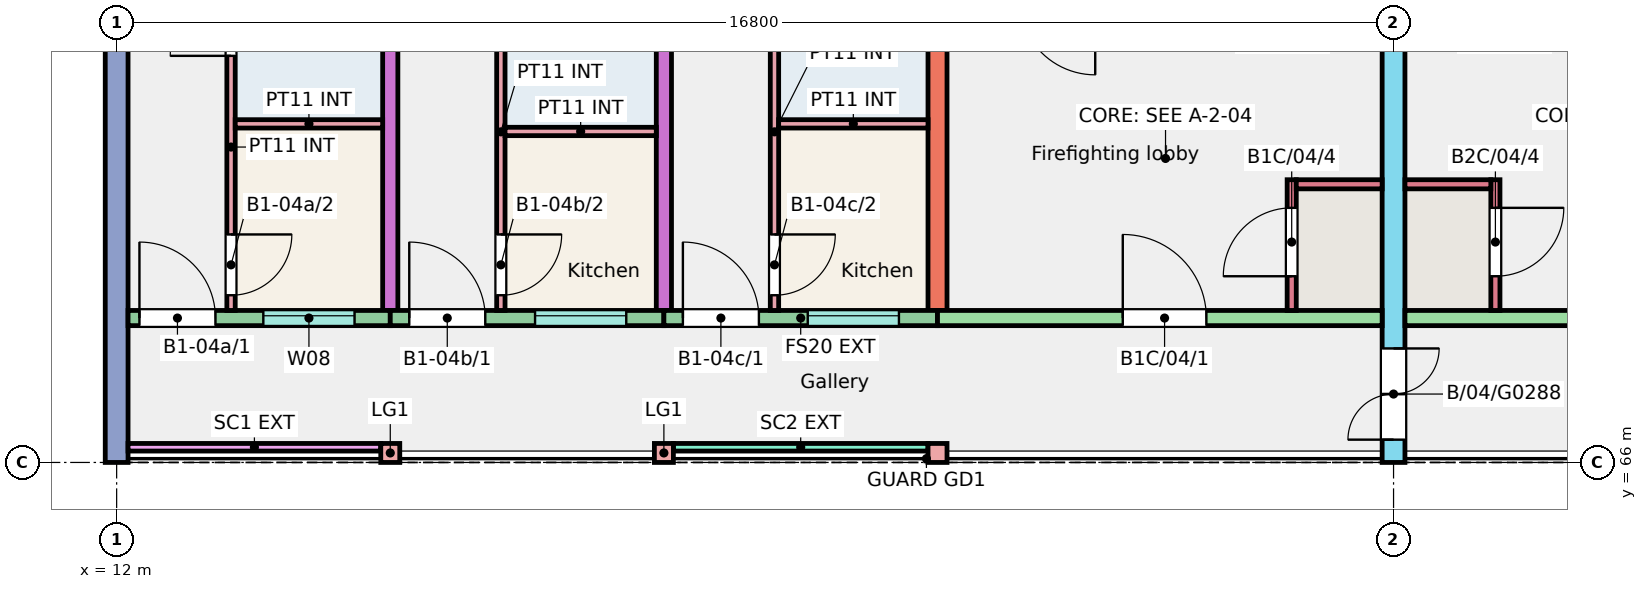
"""IFC4 building model, lengths in metres.
Left out: names, types, materials, properties, quantities, classifications, styles, units other than length and angle.
Written with IfcOpenShell. Run it as: python <this file> out.ifc"""

import sys

from ifc_helpers import new_model, si_unit, direction, frame, frame_2d, origin, origin_2d, place, context, subcontext, project, spatial, rectangle, extrude, element, fill, save


model = new_model("IFC4")
c1 = context("Model", 3, precision=1e-05, world=origin(), true_north=direction((0.0, 1.0)))
c2 = subcontext(c1, "Body", "Model", "MODEL_VIEW")
j1 = project(units=[si_unit("LENGTHUNIT", "METRE"), si_unit("PLANEANGLEUNIT", "RADIAN")], contexts=[c1])
p1 = place(None, origin())
s1 = spatial("IfcSite", under=j1, at=p1, CompositionType="ELEMENT")
p2 = place(p1, origin())
s2 = spatial("IfcBuilding", under=s1, at=p2, CompositionType="ELEMENT")
p3 = place(p2, frame((0.0, 0.0, 12.0)))
s3 = spatial("IfcBuildingStorey", under=s2, at=p3, CompositionType="ELEMENT", Elevation=12.0)
p4 = place(p3, frame((12.0, 66.0, 0.0), z_axis=(0.0, 0.0, 1.0), x_axis=(0.0, 1.0, 0.0)))
e1 = element("IfcWall", 1, at=p4, inside=s3, PredefinedType="SHEAR", context=c2, shape_type="SweptSolid", body=[
    extrude(rectangle(XDim=11.0, YDim=0.3, at=frame_2d((5.5, 0.0))), origin(), (0.0, 0.0, 1.0), 3.0),
])
p5 = place(p4, frame((7.805, 0.0, 0.9)))
e2 = element("IfcOpeningElement", 2, at=p5, cuts=e1, PredefinedType="OPENING", context=c2, shape_type="SweptSolid", body=[
    extrude(rectangle(XDim=1.8, YDim=1.5, at=frame_2d((0.9, 0.75))), frame((0.0, 0.16, 0.0), z_axis=(0.0, -1.0, 0.0), x_axis=(1.0, 0.0, 0.0)), (0.0, 0.0, 1.0), 0.32),
])
for number, where, z_axis, x_axis in (
    (3, (15.6, 68.0, 0.0), (0.0, 0.0, 1.0), (0.0, 1.0, 0.0)),
    (4, (19.2, 68.0, 0.0), (0.0, 0.0, 1.0), (0.0, 1.0, 0.0)),
):
    element("IfcWall", number, at=place(p3, frame(where, z_axis=z_axis, x_axis=x_axis)), inside=s3, PredefinedType="SHEAR", context=c2, shape_type="SweptSolid", body=[
        extrude(rectangle(XDim=9.0, YDim=0.2, at=frame_2d((4.5, 0.0))), origin(), (0.0, 0.0, 1.0), 3.0),
    ])
p6 = place(p3, frame((22.8, 68.0, 0.0), z_axis=(0.0, 0.0, 1.0), x_axis=(0.0, 1.0, 0.0)))
e5 = element("IfcWall", 5, at=p6, inside=s3, PredefinedType="SHEAR", context=c2, shape_type="SweptSolid", body=[
    extrude(rectangle(XDim=9.0, YDim=0.25, at=frame_2d((4.5, 0.0))), origin(), (0.0, 0.0, 1.0), 3.0),
])
p7 = place(p3, frame((28.8, 66.0, 0.0), z_axis=(0.0, 0.0, 1.0), x_axis=(0.0, 1.0, 0.0)))
e6 = element("IfcWall", 6, at=p7, inside=s3, PredefinedType="SHEAR", context=c2, shape_type="SweptSolid", body=[
    extrude(rectangle(XDim=11.0, YDim=0.3, at=frame_2d((5.5, 0.0))), origin(), (0.0, 0.0, 1.0), 3.0),
])
p8 = place(p7, frame((0.3, 0.0, 0.0)))
e7 = element("IfcOpeningElement", 7, at=p8, cuts=e6, PredefinedType="OPENING", context=c2, shape_type="SweptSolid", body=[
    extrude(rectangle(XDim=1.2, YDim=2.1, at=frame_2d((0.6, 1.05))), frame((0.0, 0.16, 0.0), z_axis=(0.0, -1.0, 0.0), x_axis=(1.0, 0.0, 0.0)), (0.0, 0.0, 1.0), 0.32),
])
p9 = place(p3, frame((12.15, 67.9, 0.0), z_axis=(0.0, 0.0, 1.0), x_axis=(1.0, 0.0, 0.0)))
e8 = element("IfcWall", 8, at=p9, inside=s3, PredefinedType="SOLIDWALL", context=c2, shape_type="SweptSolid", body=[
    extrude(rectangle(XDim=3.45, YDim=0.2, at=frame_2d((1.725, 0.0))), origin(), (0.0, 0.0, 1.0), 3.0),
])
p10 = place(p9, frame((1.78, 0.0, 1.1)))
e9 = element("IfcOpeningElement", 9, at=p10, cuts=e8, PredefinedType="OPENING", context=c2, shape_type="SweptSolid", body=[
    extrude(rectangle(XDim=1.2, YDim=1.3, at=frame_2d((0.6, 0.65))), frame((0.0, 0.11, 0.0), z_axis=(0.0, -1.0, 0.0), x_axis=(1.0, 0.0, 0.0)), (0.0, 0.0, 1.0), 0.22),
])
p11 = place(p9, frame((0.15, 0.0, 0.0)))
e10 = element("IfcOpeningElement", 10, at=p11, cuts=e8, PredefinedType="OPENING", context=c2, shape_type="SweptSolid", body=[
    extrude(rectangle(XDim=1.0, YDim=2.1, at=frame_2d((0.5, 1.05))), frame((0.0, 0.11, 0.0), z_axis=(0.0, -1.0, 0.0), x_axis=(1.0, 0.0, 0.0)), (0.0, 0.0, 1.0), 0.22),
])
p12 = place(p3, frame((15.6, 67.9, 0.0), z_axis=(0.0, 0.0, 1.0), x_axis=(1.0, 0.0, 0.0)))
e11 = element("IfcWall", 11, at=p12, inside=s3, PredefinedType="SOLIDWALL", context=c2, shape_type="SweptSolid", body=[
    extrude(rectangle(XDim=3.6, YDim=0.2, at=frame_2d((1.8, 0.0))), origin(), (0.0, 0.0, 1.0), 3.0),
])
p13 = place(p12, frame((1.905, 0.0, 1.1)))
e12 = element("IfcOpeningElement", 12, at=p13, cuts=e11, PredefinedType="OPENING", context=c2, shape_type="SweptSolid", body=[
    extrude(rectangle(XDim=1.2, YDim=1.3, at=frame_2d((0.6, 0.65))), frame((0.0, 0.11, 0.0), z_axis=(0.0, -1.0, 0.0), x_axis=(1.0, 0.0, 0.0)), (0.0, 0.0, 1.0), 0.22),
])
p14 = place(p12, frame((0.25, 0.0, 0.0)))
e13 = element("IfcOpeningElement", 13, at=p14, cuts=e11, PredefinedType="OPENING", context=c2, shape_type="SweptSolid", body=[
    extrude(rectangle(XDim=1.0, YDim=2.1, at=frame_2d((0.5, 1.05))), frame((0.0, 0.11, 0.0), z_axis=(0.0, -1.0, 0.0), x_axis=(1.0, 0.0, 0.0)), (0.0, 0.0, 1.0), 0.22),
])
p15 = place(p3, frame((19.2, 67.9, 0.0), z_axis=(0.0, 0.0, 1.0), x_axis=(1.0, 0.0, 0.0)))
e14 = element("IfcWall", 14, at=p15, inside=s3, PredefinedType="SOLIDWALL", context=c2, shape_type="SweptSolid", body=[
    extrude(rectangle(XDim=3.6, YDim=0.2, at=frame_2d((1.8, 0.0))), origin(), (0.0, 0.0, 1.0), 3.0),
])
p16 = place(p15, frame((1.893, 0.0, 1.1)))
e15 = element("IfcOpeningElement", 15, at=p16, cuts=e14, PredefinedType="OPENING", context=c2, shape_type="SweptSolid", body=[
    extrude(rectangle(XDim=1.2, YDim=1.3, at=frame_2d((0.6, 0.65))), frame((0.0, 0.11, 0.0), z_axis=(0.0, -1.0, 0.0), x_axis=(1.0, 0.0, 0.0)), (0.0, 0.0, 1.0), 0.22),
])
p17 = place(p15, frame((0.25, 0.0, 0.0)))
e16 = element("IfcOpeningElement", 16, at=p17, cuts=e14, PredefinedType="OPENING", context=c2, shape_type="SweptSolid", body=[
    extrude(rectangle(XDim=1.0, YDim=2.1, at=frame_2d((0.5, 1.05))), frame((0.0, 0.11, 0.0), z_axis=(0.0, -1.0, 0.0), x_axis=(1.0, 0.0, 0.0)), (0.0, 0.0, 1.0), 0.22),
])
p18 = place(p3, frame((22.8, 67.9, 0.0), z_axis=(0.0, 0.0, 1.0), x_axis=(1.0, 0.0, 0.0)))
e17 = element("IfcWall", 17, at=p18, inside=s3, PredefinedType="SHEAR", context=c2, shape_type="SweptSolid", body=[
    extrude(rectangle(XDim=5.85, YDim=0.2, at=frame_2d((2.925, 0.0))), origin(), (0.0, 0.0, 1.0), 3.0),
])
p19 = place(p18, frame((2.438, 0.0, 0.0)))
e18 = element("IfcOpeningElement", 18, at=p19, cuts=e17, PredefinedType="OPENING", context=c2, shape_type="SweptSolid", body=[
    extrude(rectangle(XDim=1.1, YDim=2.1, at=frame_2d((0.55, 1.05))), frame((0.0, 0.11, 0.0), z_axis=(0.0, -1.0, 0.0), x_axis=(1.0, 0.0, 0.0)), (0.0, 0.0, 1.0), 0.22),
])
p20 = place(p3, frame((27.46, 68.0, 0.0), z_axis=(0.0, 0.0, 1.0), x_axis=(0.0, 1.0, 0.0)))
e19 = element("IfcWall", 19, at=p20, inside=s3, PredefinedType="SHEAR", context=c2, shape_type="SweptSolid", body=[
    extrude(rectangle(XDim=1.72, YDim=0.12, at=frame_2d((0.86, 0.0))), origin(), (0.0, 0.0, 1.0), 3.0),
])
p21 = place(p20, frame((0.45, 0.0, 0.0)))
e20 = element("IfcOpeningElement", 20, at=p21, cuts=e19, PredefinedType="OPENING", context=c2, shape_type="SweptSolid", body=[
    extrude(rectangle(XDim=0.9, YDim=2.1, at=frame_2d((0.45, 1.05))), frame((0.0, 0.07, 0.0), z_axis=(0.0, -1.0, 0.0), x_axis=(1.0, 0.0, 0.0)), (0.0, 0.0, 1.0), 0.14),
])
p22 = place(p3, frame((27.52, 69.66, 0.0), z_axis=(0.0, 0.0, 1.0), x_axis=(1.0, 0.0, 0.0)))
e21 = element("IfcWall", 21, at=p22, inside=s3, PredefinedType="SHEAR", context=c2, shape_type="SweptSolid", body=[
    extrude(rectangle(XDim=1.13, YDim=0.12, at=frame_2d((0.565, 0.0))), origin(), (0.0, 0.0, 1.0), 3.0),
])
p23 = place(p3, frame((28.95, 67.9, 0.0), z_axis=(0.0, 0.0, 1.0), x_axis=(1.0, 0.0, 0.0)))
e22 = element("IfcWall", 22, at=p23, inside=s3, PredefinedType="SHEAR", context=c2, shape_type="SweptSolid", body=[
    extrude(rectangle(XDim=5.85, YDim=0.2, at=frame_2d((2.925, 0.0))), origin(), (0.0, 0.0, 1.0), 3.0),
])
p24 = place(p23, frame((2.312, 0.0, 0.0)))
e23 = element("IfcOpeningElement", 23, at=p24, cuts=e22, PredefinedType="OPENING", context=c2, shape_type="SweptSolid", body=[
    extrude(rectangle(XDim=1.1, YDim=2.1, at=frame_2d((0.55, 1.05))), frame((0.0, 0.11, 0.0), z_axis=(0.0, -1.0, 0.0), x_axis=(1.0, 0.0, 0.0)), (0.0, 0.0, 1.0), 0.22),
])
p25 = place(p3, frame((30.14, 68.0, 0.0), z_axis=(0.0, 0.0, 1.0), x_axis=(0.0, 1.0, 0.0)))
e24 = element("IfcWall", 24, at=p25, inside=s3, PredefinedType="SHEAR", context=c2, shape_type="SweptSolid", body=[
    extrude(rectangle(XDim=1.72, YDim=0.12, at=frame_2d((0.86, 0.0))), origin(), (0.0, 0.0, 1.0), 3.0),
])
p26 = place(p25, frame((0.45, 0.0, 0.0)))
e25 = element("IfcOpeningElement", 25, at=p26, cuts=e24, PredefinedType="OPENING", context=c2, shape_type="SweptSolid", body=[
    extrude(rectangle(XDim=0.9, YDim=2.1, at=frame_2d((0.45, 1.05))), frame((0.0, 0.07, 0.0), z_axis=(0.0, -1.0, 0.0), x_axis=(1.0, 0.0, 0.0)), (0.0, 0.0, 1.0), 0.14),
])
p27 = place(p3, frame((28.95, 69.66, 0.0), z_axis=(0.0, 0.0, 1.0), x_axis=(1.0, 0.0, 0.0)))
e26 = element("IfcWall", 26, at=p27, inside=s3, PredefinedType="SHEAR", context=c2, shape_type="SweptSolid", body=[
    extrude(rectangle(XDim=1.13, YDim=0.12, at=frame_2d((0.565, 0.0))), origin(), (0.0, 0.0, 1.0), 3.0),
])
for number, where, z_axis, x_axis in (
    (27, (15.6, 66.125, 0.0), (0.0, 0.0, 1.0), (1.0, 0.0, 0.0)),
    (28, (19.2, 66.125, 0.0), (0.0, 0.0, 1.0), (1.0, 0.0, 0.0)),
    (29, (22.8, 66.125, 0.0), (0.0, 0.0, 1.0), (1.0, 0.0, 0.0)),
):
    element("IfcColumn", number, at=place(p3, frame(where, z_axis=z_axis, x_axis=x_axis)), inside=s3, PredefinedType="COLUMN", context=c2, shape_type="SweptSolid", body=[
        extrude(rectangle(XDim=0.25, YDim=0.25, at=origin_2d()), origin(), (0.0, 0.0, 1.0), 3.0),
    ])
p28 = place(p3, frame((12.15, 66.2, 0.0), z_axis=(0.0, 0.0, 1.0), x_axis=(1.0, 0.0, 0.0)))
e30 = element("IfcWall", 30, at=p28, inside=s3, PredefinedType="SOLIDWALL", context=c2, shape_type="SweptSolid", body=[
    extrude(rectangle(XDim=3.325, YDim=0.1, at=frame_2d((1.663, 0.0))), origin(), (0.0, 0.0, 1.0), 2.45),
])
p29 = place(p3, frame((19.325, 66.2, 0.0), z_axis=(0.0, 0.0, 1.0), x_axis=(1.0, 0.0, 0.0)))
e31 = element("IfcWall", 31, at=p29, inside=s3, PredefinedType="SOLIDWALL", context=c2, shape_type="SweptSolid", body=[
    extrude(rectangle(XDim=3.35, YDim=0.1, at=frame_2d((1.675, 0.0))), origin(), (0.0, 0.0, 1.0), 2.45),
])
p30 = place(p3, frame((13.505, 68.0, 0.0), z_axis=(0.0, 0.0, 1.0), x_axis=(0.0, 1.0, 0.0)))
e32 = element("IfcWall", 32, at=p30, inside=s3, PredefinedType="PARTITIONING", context=c2, shape_type="SweptSolid", body=[
    extrude(rectangle(XDim=4.3, YDim=0.11, at=frame_2d((2.15, 0.0))), origin(), (0.0, 0.0, 1.0), 2.8),
])
p31 = place(p30, frame((0.2, 0.0, 0.0)))
e33 = element("IfcOpeningElement", 33, at=p31, cuts=e32, PredefinedType="OPENING", context=c2, shape_type="SweptSolid", body=[
    extrude(rectangle(XDim=0.8, YDim=2.1, at=frame_2d((0.4, 1.05))), frame((0.0, 0.065, 0.0), z_axis=(0.0, -1.0, 0.0), x_axis=(1.0, 0.0, 0.0)), (0.0, 0.0, 1.0), 0.13),
])
p32 = place(p30, frame((3.35, 0.0, 0.0)))
e34 = element("IfcOpeningElement", 34, at=p32, cuts=e32, PredefinedType="OPENING", context=c2, shape_type="SweptSolid", body=[
    extrude(rectangle(XDim=0.8, YDim=2.1, at=frame_2d((0.4, 1.05))), frame((0.0, 0.065, 0.0), z_axis=(0.0, -1.0, 0.0), x_axis=(1.0, 0.0, 0.0)), (0.0, 0.0, 1.0), 0.13),
])
p33 = place(p3, frame((13.56, 70.455, 0.0), z_axis=(0.0, 0.0, 1.0), x_axis=(1.0, 0.0, 0.0)))
e35 = element("IfcWall", 35, at=p33, inside=s3, PredefinedType="PARTITIONING", context=c2, shape_type="SweptSolid", body=[
    extrude(rectangle(XDim=1.94, YDim=0.11, at=frame_2d((0.97, 0.0))), origin(), (0.0, 0.0, 1.0), 2.8),
])
p34 = place(p3, frame((17.055, 68.0, 0.0), z_axis=(0.0, 0.0, 1.0), x_axis=(0.0, 1.0, 0.0)))
e36 = element("IfcWall", 36, at=p34, inside=s3, PredefinedType="PARTITIONING", context=c2, shape_type="SweptSolid", body=[
    extrude(rectangle(XDim=4.7, YDim=0.11, at=frame_2d((2.35, 0.0))), origin(), (0.0, 0.0, 1.0), 2.8),
])
p35 = place(p34, frame((0.2, 0.0, 0.0)))
e37 = element("IfcOpeningElement", 37, at=p35, cuts=e36, PredefinedType="OPENING", context=c2, shape_type="SweptSolid", body=[
    extrude(rectangle(XDim=0.8, YDim=2.1, at=frame_2d((0.4, 1.05))), frame((0.0, 0.065, 0.0), z_axis=(0.0, -1.0, 0.0), x_axis=(1.0, 0.0, 0.0)), (0.0, 0.0, 1.0), 0.13),
])
p36 = place(p34, frame((3.75, 0.0, 0.0)))
e38 = element("IfcOpeningElement", 38, at=p36, cuts=e36, PredefinedType="OPENING", context=c2, shape_type="SweptSolid", body=[
    extrude(rectangle(XDim=0.8, YDim=2.1, at=frame_2d((0.4, 1.05))), frame((0.0, 0.065, 0.0), z_axis=(0.0, -1.0, 0.0), x_axis=(1.0, 0.0, 0.0)), (0.0, 0.0, 1.0), 0.13),
])
p37 = place(p3, frame((17.11, 70.355, 0.0), z_axis=(0.0, 0.0, 1.0), x_axis=(1.0, 0.0, 0.0)))
e39 = element("IfcWall", 39, at=p37, inside=s3, PredefinedType="PARTITIONING", context=c2, shape_type="SweptSolid", body=[
    extrude(rectangle(XDim=1.99, YDim=0.11, at=frame_2d((0.995, 0.0))), origin(), (0.0, 0.0, 1.0), 2.8),
])
p38 = place(p3, frame((20.655, 68.0, 0.0), z_axis=(0.0, 0.0, 1.0), x_axis=(0.0, 1.0, 0.0)))
e40 = element("IfcWall", 40, at=p38, inside=s3, PredefinedType="PARTITIONING", context=c2, shape_type="SweptSolid", body=[
    extrude(rectangle(XDim=4.7, YDim=0.11, at=frame_2d((2.35, 0.0))), origin(), (0.0, 0.0, 1.0), 2.8),
])
p39 = place(p38, frame((0.2, 0.0, 0.0)))
e41 = element("IfcOpeningElement", 41, at=p39, cuts=e40, PredefinedType="OPENING", context=c2, shape_type="SweptSolid", body=[
    extrude(rectangle(XDim=0.8, YDim=2.1, at=frame_2d((0.4, 1.05))), frame((0.0, 0.065, 0.0), z_axis=(0.0, -1.0, 0.0), x_axis=(1.0, 0.0, 0.0)), (0.0, 0.0, 1.0), 0.13),
])
p40 = place(p38, frame((3.75, 0.0, 0.0)))
e42 = element("IfcOpeningElement", 42, at=p40, cuts=e40, PredefinedType="OPENING", context=c2, shape_type="SweptSolid", body=[
    extrude(rectangle(XDim=0.8, YDim=2.1, at=frame_2d((0.4, 1.05))), frame((0.0, 0.065, 0.0), z_axis=(0.0, -1.0, 0.0), x_axis=(1.0, 0.0, 0.0)), (0.0, 0.0, 1.0), 0.13),
])
p41 = place(p3, frame((20.71, 70.455, 0.0), z_axis=(0.0, 0.0, 1.0), x_axis=(1.0, 0.0, 0.0)))
e43 = element("IfcWall", 43, at=p41, inside=s3, PredefinedType="PARTITIONING", context=c2, shape_type="SweptSolid", body=[
    extrude(rectangle(XDim=1.965, YDim=0.11, at=frame_2d((0.982, 0.0))), origin(), (0.0, 0.0, 1.0), 2.8),
])
p42 = place(p10, origin())
e44 = element("IfcWindow", 44, at=p42, inside=s3, PartitioningType="SINGLE_PANEL", PredefinedType="WINDOW", context=c2, shape_type="SweptSolid", body=[
    extrude(rectangle(XDim=1.2, YDim=1.3, at=frame_2d((0.6, 0.65))), frame((0.0, 0.06, 0.0), z_axis=(0.0, -1.0, 0.0), x_axis=(1.0, 0.0, 0.0)), (0.0, 0.0, 1.0), 0.06),
])
fill(e9, e44)
p43 = place(p13, origin())
e45 = element("IfcWindow", 45, at=p43, inside=s3, PartitioningType="SINGLE_PANEL", PredefinedType="WINDOW", context=c2, shape_type="SweptSolid", body=[
    extrude(rectangle(XDim=1.2, YDim=1.3, at=frame_2d((0.6, 0.65))), frame((0.0, 0.06, 0.0), z_axis=(0.0, -1.0, 0.0), x_axis=(1.0, 0.0, 0.0)), (0.0, 0.0, 1.0), 0.06),
])
fill(e12, e45)
p44 = place(p16, origin())
e46 = element("IfcWindow", 46, at=p44, inside=s3, PartitioningType="SINGLE_PANEL", PredefinedType="WINDOW", context=c2, shape_type="SweptSolid", body=[
    extrude(rectangle(XDim=1.2, YDim=1.3, at=frame_2d((0.6, 0.65))), frame((0.0, 0.06, 0.0), z_axis=(0.0, -1.0, 0.0), x_axis=(1.0, 0.0, 0.0)), (0.0, 0.0, 1.0), 0.06),
])
fill(e15, e46)
p45 = place(p11, origin())
e47 = element("IfcDoor", 47, at=p45, inside=s3, OperationType="SINGLE_SWING_LEFT", PredefinedType="DOOR", context=c2, shape_type="SweptSolid", body=[
    extrude(rectangle(XDim=1.0, YDim=2.1, at=frame_2d((0.5, 1.05))), frame((0.0, 0.025, 0.0), z_axis=(0.0, -1.0, 0.0), x_axis=(1.0, 0.0, 0.0)), (0.0, 0.0, 1.0), 0.05),
])
fill(e10, e47)
p46 = place(p31, origin())
e48 = element("IfcDoor", 48, at=p46, inside=s3, OperationType="SINGLE_SWING_RIGHT", PredefinedType="DOOR", context=c2, shape_type="SweptSolid", body=[
    extrude(rectangle(XDim=0.8, YDim=2.1, at=frame_2d((0.4, 1.05))), frame((0.0, 0.025, 0.0), z_axis=(0.0, -1.0, 0.0), x_axis=(1.0, 0.0, 0.0)), (0.0, 0.0, 1.0), 0.05),
])
fill(e33, e48)
p47 = place(p32, origin())
e49 = element("IfcDoor", 49, at=p47, inside=s3, OperationType="SINGLE_SWING_LEFT", PredefinedType="DOOR", context=c2, shape_type="SweptSolid", body=[
    extrude(rectangle(XDim=0.8, YDim=2.1, at=frame_2d((0.4, 1.05))), frame((0.0, 0.025, 0.0), z_axis=(0.0, -1.0, 0.0), x_axis=(1.0, 0.0, 0.0)), (0.0, 0.0, 1.0), 0.05),
])
fill(e34, e49)
p48 = place(p14, origin())
e50 = element("IfcDoor", 50, at=p48, inside=s3, OperationType="SINGLE_SWING_LEFT", PredefinedType="DOOR", context=c2, shape_type="SweptSolid", body=[
    extrude(rectangle(XDim=1.0, YDim=2.1, at=frame_2d((0.5, 1.05))), frame((0.0, 0.025, 0.0), z_axis=(0.0, -1.0, 0.0), x_axis=(1.0, 0.0, 0.0)), (0.0, 0.0, 1.0), 0.05),
])
fill(e13, e50)
p49 = place(p35, origin())
e51 = element("IfcDoor", 51, at=p49, inside=s3, OperationType="SINGLE_SWING_RIGHT", PredefinedType="DOOR", context=c2, shape_type="SweptSolid", body=[
    extrude(rectangle(XDim=0.8, YDim=2.1, at=frame_2d((0.4, 1.05))), frame((0.0, 0.025, 0.0), z_axis=(0.0, -1.0, 0.0), x_axis=(1.0, 0.0, 0.0)), (0.0, 0.0, 1.0), 0.05),
])
fill(e37, e51)
p50 = place(p17, origin())
e52 = element("IfcDoor", 52, at=p50, inside=s3, OperationType="SINGLE_SWING_LEFT", PredefinedType="DOOR", context=c2, shape_type="SweptSolid", body=[
    extrude(rectangle(XDim=1.0, YDim=2.1, at=frame_2d((0.5, 1.05))), frame((0.0, 0.025, 0.0), z_axis=(0.0, -1.0, 0.0), x_axis=(1.0, 0.0, 0.0)), (0.0, 0.0, 1.0), 0.05),
])
fill(e16, e52)
p51 = place(p39, origin())
e53 = element("IfcDoor", 53, at=p51, inside=s3, OperationType="SINGLE_SWING_RIGHT", PredefinedType="DOOR", context=c2, shape_type="SweptSolid", body=[
    extrude(rectangle(XDim=0.8, YDim=2.1, at=frame_2d((0.4, 1.05))), frame((0.0, 0.025, 0.0), z_axis=(0.0, -1.0, 0.0), x_axis=(1.0, 0.0, 0.0)), (0.0, 0.0, 1.0), 0.05),
])
fill(e41, e53)
p52 = place(p19, origin())
e54 = element("IfcDoor", 54, at=p52, inside=s3, OperationType="SINGLE_SWING_LEFT", PredefinedType="DOOR", context=c2, shape_type="SweptSolid", body=[
    extrude(rectangle(XDim=1.1, YDim=2.1, at=frame_2d((0.55, 1.05))), frame((0.0, 0.025, 0.0), z_axis=(0.0, -1.0, 0.0), x_axis=(1.0, 0.0, 0.0)), (0.0, 0.0, 1.0), 0.05),
])
fill(e18, e54)
p53 = place(p21, origin())
e55 = element("IfcDoor", 55, at=p53, inside=s3, OperationType="SINGLE_SWING_LEFT", PredefinedType="DOOR", context=c2, shape_type="SweptSolid", body=[
    extrude(rectangle(XDim=0.9, YDim=2.1, at=frame_2d((0.45, 1.05))), frame((0.0, 0.025, 0.0), z_axis=(0.0, -1.0, 0.0), x_axis=(1.0, 0.0, 0.0)), (0.0, 0.0, 1.0), 0.05),
])
fill(e20, e55)
p54 = place(p26, origin())
e56 = element("IfcDoor", 56, at=p54, inside=s3, OperationType="SINGLE_SWING_RIGHT", PredefinedType="DOOR", context=c2, shape_type="SweptSolid", body=[
    extrude(rectangle(XDim=0.9, YDim=2.1, at=frame_2d((0.45, 1.05))), frame((0.0, 0.025, 0.0), z_axis=(0.0, -1.0, 0.0), x_axis=(1.0, 0.0, 0.0)), (0.0, 0.0, 1.0), 0.05),
])
fill(e25, e56)
p55 = place(p8, origin())
e57 = element("IfcDoor", 57, at=p55, inside=s3, OperationType="DOUBLE_DOOR_SINGLE_SWING", PredefinedType="DOOR", context=c2, shape_type="SweptSolid", body=[
    extrude(rectangle(XDim=1.2, YDim=2.1, at=frame_2d((0.6, 1.05))), frame((0.0, 0.025, 0.0), z_axis=(0.0, -1.0, 0.0), x_axis=(1.0, 0.0, 0.0)), (0.0, 0.0, 1.0), 0.05),
])
fill(e7, e57)
save(model, sys.argv[1])
